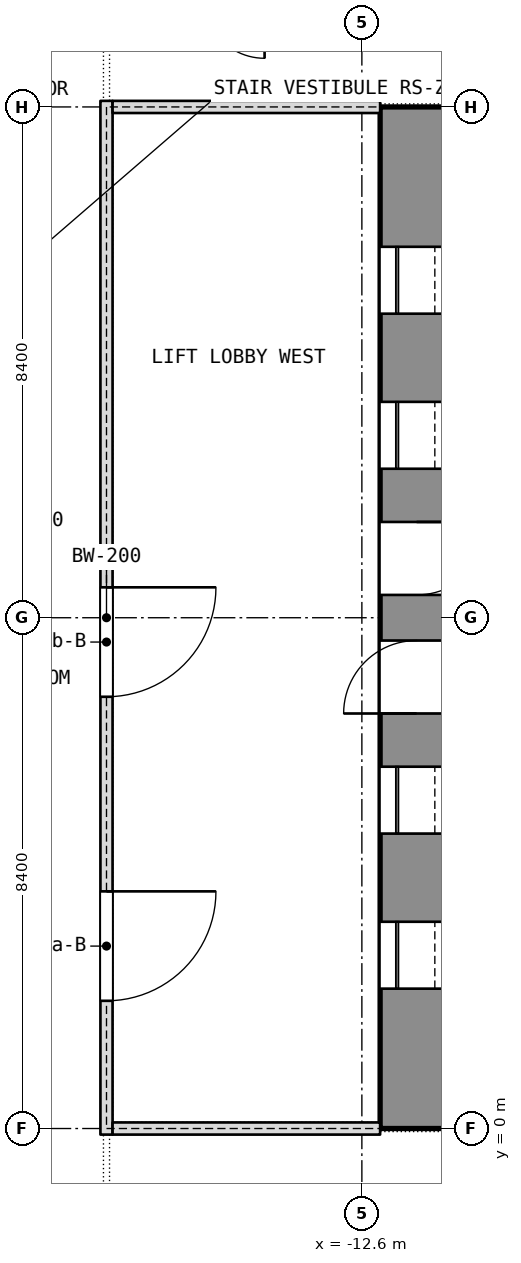
"""IFC4 building model, lengths in metres.
Left out: names, types, materials, properties, quantities, classifications, styles, units other than length and angle.
Written with IfcOpenShell. Run it as: python <this file> out.ifc"""

import sys

from ifc_helpers import new_model, si_unit, direction, frame, frame_2d, origin, place, context, subcontext, project, spatial, rectangle, extrude, element, fill, save


model = new_model("IFC4")
c1 = context("Model", 3, precision=1e-05, world=origin(), true_north=direction((0.0, 1.0)))
c2 = subcontext(c1, "Body", "Model", "MODEL_VIEW")
j1 = project(units=[si_unit("LENGTHUNIT", "METRE"), si_unit("PLANEANGLEUNIT", "RADIAN")], contexts=[c1])
p1 = place(None, origin())
s1 = spatial("IfcSite", under=j1, at=p1, CompositionType="ELEMENT")
p2 = place(p1, origin())
s2 = spatial("IfcBuilding", under=s1, at=p2, CompositionType="ELEMENT")
p3 = place(p2, frame((0.0, 0.0, 65.3)))
s3 = spatial("IfcBuildingStorey", under=s2, at=p3, CompositionType="ELEMENT", Elevation=65.3)
p4 = place(p3, frame((-11.7, 0.0, 0.0), z_axis=(0.0, 0.0, 1.0), x_axis=(0.0, 1.0, 0.0)))
e1 = element("IfcWall", 1, at=p4, inside=s3, PredefinedType="SHEAR", context=c2, shape_type="SweptSolid", body=[
    extrude(rectangle(XDim=16.8, YDim=1.2, at=frame_2d((8.4, 0.0))), origin(), (0.0, 0.0, 1.0), 3.6),
])
p5 = place(p4, frame((2.3, 0.0, 0.0)))
e2 = element("IfcOpeningElement", 2, at=p5, cuts=e1, PredefinedType="OPENING", context=c2, shape_type="SweptSolid", body=[
    extrude(rectangle(XDim=1.1, YDim=2.1, at=frame_2d((0.55, 1.05))), frame((0.0, 0.6, 0.0), z_axis=(0.0, -1.0, 0.0), x_axis=(1.0, 0.0, 0.0)), (0.0, 0.0, 1.0), 1.2),
])
p6 = place(p4, frame((4.85, 0.0, 0.0)))
e3 = element("IfcOpeningElement", 3, at=p6, cuts=e1, PredefinedType="OPENING", context=c2, shape_type="SweptSolid", body=[
    extrude(rectangle(XDim=1.1, YDim=2.1, at=frame_2d((0.55, 1.05))), frame((0.0, 0.6, 0.0), z_axis=(0.0, -1.0, 0.0), x_axis=(1.0, 0.0, 0.0)), (0.0, 0.0, 1.0), 1.2),
])
p7 = place(p4, frame((6.825, 0.0, 0.0)))
e4 = element("IfcOpeningElement", 4, at=p7, cuts=e1, PredefinedType="OPENING", context=c2, shape_type="SweptSolid", body=[
    extrude(rectangle(XDim=1.2, YDim=2.1, at=frame_2d((0.6, 1.05))), frame((0.0, 0.6, 0.0), z_axis=(0.0, -1.0, 0.0), x_axis=(1.0, 0.0, 0.0)), (0.0, 0.0, 1.0), 1.2),
])
p8 = place(p4, frame((13.4, 0.0, 0.0)))
e5 = element("IfcOpeningElement", 5, at=p8, cuts=e1, PredefinedType="OPENING", context=c2, shape_type="SweptSolid", body=[
    extrude(rectangle(XDim=1.1, YDim=2.1, at=frame_2d((0.55, 1.05))), frame((0.0, 0.6, 0.0), z_axis=(0.0, -1.0, 0.0), x_axis=(1.0, 0.0, 0.0)), (0.0, 0.0, 1.0), 1.2),
])
p9 = place(p4, frame((10.85, 0.0, 0.0)))
e6 = element("IfcOpeningElement", 6, at=p9, cuts=e1, PredefinedType="OPENING", context=c2, shape_type="SweptSolid", body=[
    extrude(rectangle(XDim=1.1, YDim=2.1, at=frame_2d((0.55, 1.05))), frame((0.0, 0.6, 0.0), z_axis=(0.0, -1.0, 0.0), x_axis=(1.0, 0.0, 0.0)), (0.0, 0.0, 1.0), 1.2),
])
p10 = place(p4, frame((8.775, 0.0, 0.0)))
e7 = element("IfcOpeningElement", 7, at=p10, cuts=e1, PredefinedType="OPENING", context=c2, shape_type="SweptSolid", body=[
    extrude(rectangle(XDim=1.2, YDim=2.1, at=frame_2d((0.6, 1.05))), frame((0.0, 0.6, 0.0), z_axis=(0.0, -1.0, 0.0), x_axis=(1.0, 0.0, 0.0)), (0.0, 0.0, 1.0), 1.2),
])
p11 = place(p3, frame((-16.8, -0.1, 0.0), z_axis=(0.0, 0.0, 1.0), x_axis=(0.0, 1.0, 0.0)))
e8 = element("IfcWall", 8, at=p11, inside=s3, PredefinedType="PARTITIONING", context=c2, shape_type="SweptSolid", body=[
    extrude(rectangle(XDim=17.0, YDim=0.2, at=frame_2d((8.5, 0.0))), origin(), (0.0, 0.0, 1.0), 3.34),
])
p12 = place(p11, frame((2.2, 0.0, 0.0)))
e9 = element("IfcOpeningElement", 9, at=p12, cuts=e8, PredefinedType="OPENING", context=c2, shape_type="SweptSolid", body=[
    extrude(rectangle(XDim=1.8, YDim=2.1, at=frame_2d((0.9, 1.05))), frame((0.0, 0.1, 0.0), z_axis=(0.0, -1.0, 0.0), x_axis=(1.0, 0.0, 0.0)), (0.0, 0.0, 1.0), 0.2),
])
p13 = place(p11, frame((7.2, 0.0, 0.0)))
e10 = element("IfcOpeningElement", 10, at=p13, cuts=e8, PredefinedType="OPENING", context=c2, shape_type="SweptSolid", body=[
    extrude(rectangle(XDim=1.8, YDim=2.1, at=frame_2d((0.9, 1.05))), frame((0.0, 0.1, 0.0), z_axis=(0.0, -1.0, 0.0), x_axis=(1.0, 0.0, 0.0)), (0.0, 0.0, 1.0), 0.2),
])
for number, where, z_axis, x_axis in (
    (11, (-16.7, 0.0, 0.0), (0.0, 0.0, 1.0), (1.0, 0.0, 0.0)),
    (12, (-16.7, 16.8, 0.0), (0.0, 0.0, 1.0), (1.0, 0.0, 0.0)),
):
    element("IfcWall", number, at=place(p3, frame(where, z_axis=z_axis, x_axis=x_axis)), inside=s3, PredefinedType="PARTITIONING", context=c2, shape_type="SweptSolid", body=[
        extrude(rectangle(XDim=4.4, YDim=0.2, at=frame_2d((2.2, 0.0))), origin(), (0.0, 0.0, 1.0), 2.84),
    ])
p14 = place(p5, origin())
e13 = element("IfcDoor", 13, at=p14, inside=s3, OperationType="SLIDING_TO_LEFT", PredefinedType="DOOR", context=c2, shape_type="SweptSolid", body=[
    extrude(rectangle(XDim=1.1, YDim=2.1, at=frame_2d((0.55, 1.05))), frame((0.0, 0.025, 0.0), z_axis=(0.0, -1.0, 0.0), x_axis=(1.0, 0.0, 0.0)), (0.0, 0.0, 1.0), 0.05),
])
fill(e2, e13)
p15 = place(p6, origin())
e14 = element("IfcDoor", 14, at=p15, inside=s3, OperationType="SLIDING_TO_LEFT", PredefinedType="DOOR", context=c2, shape_type="SweptSolid", body=[
    extrude(rectangle(XDim=1.1, YDim=2.1, at=frame_2d((0.55, 1.05))), frame((0.0, 0.025, 0.0), z_axis=(0.0, -1.0, 0.0), x_axis=(1.0, 0.0, 0.0)), (0.0, 0.0, 1.0), 0.05),
])
fill(e3, e14)
p16 = place(p7, origin())
e15 = element("IfcDoor", 15, at=p16, inside=s3, OperationType="SINGLE_SWING_LEFT", PredefinedType="DOOR", context=c2, shape_type="SweptSolid", body=[
    extrude(rectangle(XDim=1.2, YDim=2.1, at=frame_2d((0.6, 1.05))), frame((0.0, 0.025, 0.0), z_axis=(0.0, -1.0, 0.0), x_axis=(1.0, 0.0, 0.0)), (0.0, 0.0, 1.0), 0.05),
])
fill(e4, e15)
p17 = place(p8, origin())
e16 = element("IfcDoor", 16, at=p17, inside=s3, OperationType="SLIDING_TO_LEFT", PredefinedType="DOOR", context=c2, shape_type="SweptSolid", body=[
    extrude(rectangle(XDim=1.1, YDim=2.1, at=frame_2d((0.55, 1.05))), frame((0.0, 0.025, 0.0), z_axis=(0.0, -1.0, 0.0), x_axis=(1.0, 0.0, 0.0)), (0.0, 0.0, 1.0), 0.05),
])
fill(e5, e16)
p18 = place(p9, origin())
e17 = element("IfcDoor", 17, at=p18, inside=s3, OperationType="SLIDING_TO_LEFT", PredefinedType="DOOR", context=c2, shape_type="SweptSolid", body=[
    extrude(rectangle(XDim=1.1, YDim=2.1, at=frame_2d((0.55, 1.05))), frame((0.0, 0.025, 0.0), z_axis=(0.0, -1.0, 0.0), x_axis=(1.0, 0.0, 0.0)), (0.0, 0.0, 1.0), 0.05),
])
fill(e6, e17)
p19 = place(p10, origin())
e18 = element("IfcDoor", 18, at=p19, inside=s3, OperationType="SINGLE_SWING_LEFT", PredefinedType="DOOR", context=c2, shape_type="SweptSolid", body=[
    extrude(rectangle(XDim=1.2, YDim=2.1, at=frame_2d((0.6, 1.05))), frame((0.0, 0.025, 0.0), z_axis=(0.0, -1.0, 0.0), x_axis=(1.0, 0.0, 0.0)), (0.0, 0.0, 1.0), 0.05),
])
fill(e7, e18)
p20 = place(p12, origin())
e19 = element("IfcDoor", 19, at=p20, inside=s3, OperationType="DOUBLE_DOOR_SINGLE_SWING", PredefinedType="DOOR", context=c2, shape_type="SweptSolid", body=[
    extrude(rectangle(XDim=1.8, YDim=2.1, at=frame_2d((0.9, 1.05))), frame((0.0, 0.025, 0.0), z_axis=(0.0, -1.0, 0.0), x_axis=(1.0, 0.0, 0.0)), (0.0, 0.0, 1.0), 0.05),
])
fill(e9, e19)
p21 = place(p13, origin())
e20 = element("IfcDoor", 20, at=p21, inside=s3, OperationType="DOUBLE_DOOR_SINGLE_SWING", PredefinedType="DOOR", context=c2, shape_type="SweptSolid", body=[
    extrude(rectangle(XDim=1.8, YDim=2.1, at=frame_2d((0.9, 1.05))), frame((0.0, 0.025, 0.0), z_axis=(0.0, -1.0, 0.0), x_axis=(1.0, 0.0, 0.0)), (0.0, 0.0, 1.0), 0.05),
])
fill(e10, e20)
save(model, sys.argv[1])
